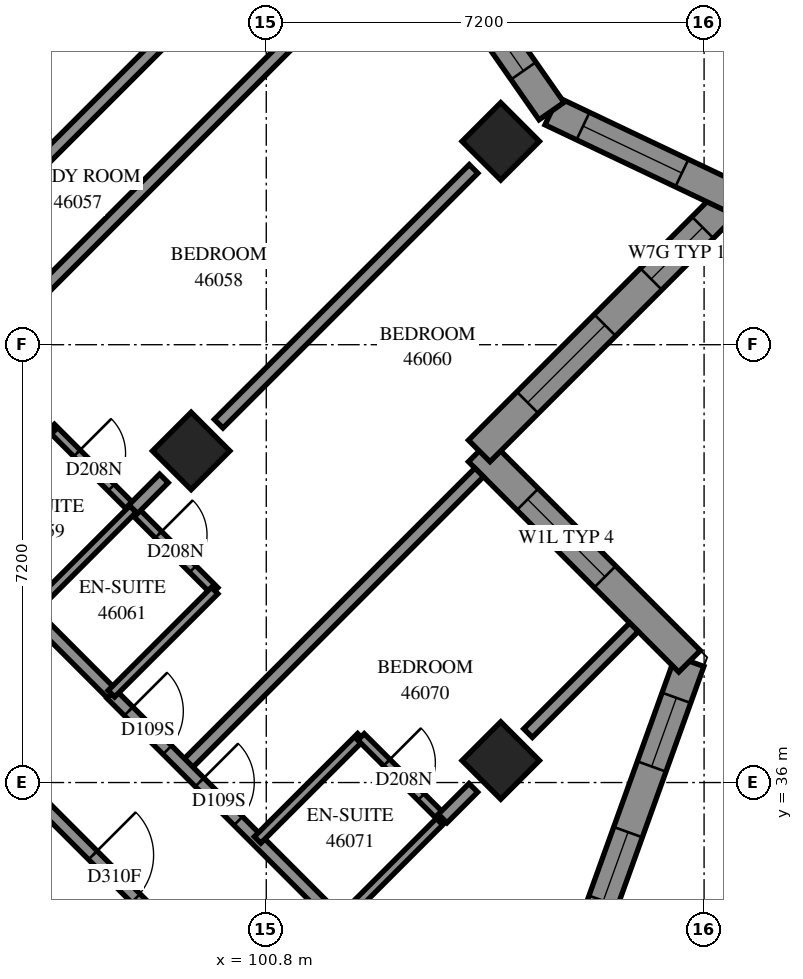
"""IFC4 building model, lengths in metres.
Left out: names, types, materials, properties, quantities, classifications, styles, units other than length and angle.
Written with IfcOpenShell. Run it as: python <this file> out.ifc"""

import sys

from ifc_helpers import new_model, si_unit, direction, frame, frame_2d, origin, origin_2d, place, context, subcontext, project, spatial, polyline, rectangle, outline, extrude, element, fill, save


model = new_model("IFC4")
c1 = context("Model", 3, precision=1e-05, world=origin(), true_north=direction((0.0, 1.0)))
c2 = subcontext(c1, "Body", "Model", "MODEL_VIEW")
j1 = project(units=[si_unit("LENGTHUNIT", "METRE"), si_unit("PLANEANGLEUNIT", "RADIAN")], contexts=[c1])
p1 = place(None, origin())
s1 = spatial("IfcSite", under=j1, at=p1, CompositionType="ELEMENT")
p2 = place(p1, origin())
s2 = spatial("IfcBuilding", under=s1, at=p2, CompositionType="ELEMENT")
p3 = place(p2, frame((0.0, 0.0, 169.4)))
s3 = spatial("IfcBuildingStorey", under=s2, at=p3, CompositionType="ELEMENT", Elevation=169.4)
for number, where, z_axis, x_axis in (
    (1, (104.656, 46.544, 0.0), (0.0, 0.0, 1.0), (0.707, -0.707, 0.0)),
    (2, (99.565, 41.453, 0.0), (0.0, 0.0, 1.0), (0.707, -0.707, 0.0)),
    (3, (104.656, 36.362, 0.0), (0.0, 0.0, 1.0), (0.707, -0.707, 0.0)),
):
    element("IfcColumn", number, at=place(p3, frame(where, z_axis=z_axis, x_axis=x_axis)), inside=s3, PredefinedType="COLUMN", context=c2, shape_type="SweptSolid", body=[
        extrude(rectangle(XDim=0.9, YDim=0.9, at=origin_2d()), origin(), (0.0, 0.0, 1.0), 3.1),
    ])
p4 = place(p3, frame((87.049, 38.695, -0.3), z_axis=(0.0, 0.0, 1.0), x_axis=(0.7071067812, 0.7071067812, 0.0)))
e4 = element("IfcWall", 4, at=p4, inside=s3, PredefinedType="SHEAR", context=c2, shape_type="SweptSolid", body=[
    extrude(rectangle(XDim=14.4, YDim=0.6, at=frame_2d((7.2, 0.0))), origin(), (0.0, 0.0, 1.0), 2.7),
])
p5 = place(p4, frame((4.55, 0.0, 0.3)))
e5 = element("IfcOpeningElement", 5, at=p5, cuts=e4, PredefinedType="OPENING", context=c2, shape_type="SweptSolid", body=[
    extrude(rectangle(XDim=1.1, YDim=2.1, at=frame_2d((0.55, 1.05))), frame((0.0, 0.31, 0.0), z_axis=(0.0, -1.0, 0.0), x_axis=(1.0, 0.0, 0.0)), (0.0, 0.0, 1.0), 0.62),
])
p6 = place(p4, frame((11.35, 0.0, 0.3)))
e6 = element("IfcOpeningElement", 6, at=p6, cuts=e4, PredefinedType="OPENING", context=c2, shape_type="SweptSolid", body=[
    extrude(rectangle(XDim=1.1, YDim=2.1, at=frame_2d((0.55, 1.05))), frame((0.0, 0.31, 0.0), z_axis=(0.0, -1.0, 0.0), x_axis=(1.0, 0.0, 0.0)), (0.0, 0.0, 1.0), 0.62),
])
p7 = place(p3, frame((105.943, 32.946, 0.0), z_axis=(0.0, 0.0, 1.0), x_axis=(0.3387755622, 0.9408672162, 0.0)))
e7 = element("IfcWall", 7, at=p7, inside=s3, PredefinedType="SOLIDWALL", context=c2, shape_type="SweptSolid", body=[
    extrude(outline(polyline([(-0.113, -0.25), (5.524, -0.25), (5.207, 0.25), (0.113, 0.25), (-0.113, -0.25)])), origin(), (0.0, 0.0, 1.0), 3.1),
])
p8 = place(p7, frame((1.179, 0.0, 0.45)))
e8 = element("IfcOpeningElement", 8, at=p8, cuts=e7, PredefinedType="OPENING", context=c2, shape_type="SweptSolid", body=[
    extrude(rectangle(XDim=1.2, YDim=2.5, at=frame_2d((0.6, 1.25))), frame((0.0, 0.26, 0.0), z_axis=(0.0, -1.0, 0.0), x_axis=(1.0, 0.0, 0.0)), (0.0, 0.0, 1.0), 0.52),
])
p9 = place(p7, frame((3.527, 0.0, 0.45)))
e9 = element("IfcOpeningElement", 9, at=p9, cuts=e7, PredefinedType="OPENING", context=c2, shape_type="SweptSolid", body=[
    extrude(rectangle(XDim=1.2, YDim=2.5, at=frame_2d((0.6, 1.25))), frame((0.0, 0.26, 0.0), z_axis=(0.0, -1.0, 0.0), x_axis=(1.0, 0.0, 0.0)), (0.0, 0.0, 1.0), 0.52),
])
p10 = place(p3, frame((107.761, 37.994, 0.0), z_axis=(0.0, 0.0, 1.0), x_axis=(-0.7071170031, 0.7070965591, 0.0)))
e10 = element("IfcWall", 10, at=p10, inside=s3, PredefinedType="SOLIDWALL", context=c2, shape_type="SweptSolid", body=[
    extrude(outline(polyline([(-0.159, -0.25), (4.641, -0.25), (5.141, 0.25), (0.159, 0.25), (-0.159, -0.25)])), origin(), (0.0, 0.0, 1.0), 3.1),
])
p11 = place(p10, frame((1.966, 0.0, 0.6)))
e11 = element("IfcOpeningElement", 11, at=p11, cuts=e10, PredefinedType="OPENING", context=c2, shape_type="SweptSolid", body=[
    extrude(rectangle(XDim=1.8, YDim=1.9, at=frame_2d((0.9, 0.95))), frame((0.0, 0.26, 0.0), z_axis=(0.0, -1.0, 0.0), x_axis=(1.0, 0.0, 0.0)), (0.0, 0.0, 1.0), 0.52),
])
p12 = place(p3, frame((104.302, 41.453, 0.0), z_axis=(0.0, 0.0, 1.0), x_axis=(0.7071237335, 0.7070898285, 0.0)))
e12 = element("IfcWall", 12, at=p12, inside=s3, PredefinedType="SOLIDWALL", context=c2, shape_type="SweptSolid", body=[
    extrude(outline(polyline([(0.25, -0.25), (6.253, -0.25), (5.545, 0.25), (-0.25, 0.25), (0.25, -0.25)])), origin(), (0.0, 0.0, 1.0), 2.6),
])
p13 = place(p12, frame((1.125, 0.0, 0.6)))
e13 = element("IfcOpeningElement", 13, at=p13, cuts=e12, PredefinedType="OPENING", context=c2, shape_type="SweptSolid", body=[
    extrude(rectangle(XDim=1.8, YDim=1.9, at=frame_2d((0.9, 0.95))), frame((0.0, 0.26, 0.0), z_axis=(0.0, -1.0, 0.0), x_axis=(1.0, 0.0, 0.0)), (0.0, 0.0, 1.0), 0.52),
])
p14 = place(p12, frame((3.997, 0.0, 0.6)))
e14 = element("IfcOpeningElement", 14, at=p14, cuts=e12, PredefinedType="OPENING", context=c2, shape_type="SweptSolid", body=[
    extrude(rectangle(XDim=1.2, YDim=1.9, at=frame_2d((0.6, 0.95))), frame((0.0, 0.26, 0.0), z_axis=(0.0, -1.0, 0.0), x_axis=(1.0, 0.0, 0.0)), (0.0, 0.0, 1.0), 0.52),
])
p15 = place(p3, frame((108.473, 45.624, 0.0), z_axis=(0.0, 0.0, 1.0), x_axis=(-0.9031580638, 0.4293081781, 0.0)))
e15 = element("IfcWall", 15, at=p15, inside=s3, PredefinedType="SOLIDWALL", context=c2, shape_type="SweptSolid", body=[
    extrude(outline(polyline([(-0.354, -0.25), (3.236, -0.25), (3.369, 0.25), (0.354, 0.25), (-0.354, -0.25)])), origin(), (0.0, 0.0, 1.0), 2.6),
])
p16 = place(p15, frame((0.928, 0.0, 0.6)))
e16 = element("IfcOpeningElement", 16, at=p16, cuts=e15, PredefinedType="OPENING", context=c2, shape_type="SweptSolid", body=[
    extrude(rectangle(XDim=1.8, YDim=1.9, at=frame_2d((0.9, 0.95))), frame((0.0, 0.26, 0.0), z_axis=(0.0, -1.0, 0.0), x_axis=(1.0, 0.0, 0.0)), (0.0, 0.0, 1.0), 0.52),
])
p17 = place(p3, frame((105.491, 47.042, 0.0), z_axis=(0.0, 0.0, 1.0), x_axis=(-0.5720427166, 0.8202238295, 0.0)))
e17 = element("IfcWall", 17, at=p17, inside=s3, PredefinedType="SOLIDWALL", context=c2, shape_type="SweptSolid", body=[
    extrude(outline(polyline([(0.066, -0.25), (3.502, -0.25), (3.413, 0.25), (-0.066, 0.25), (0.066, -0.25)])), origin(), (0.0, 0.0, 1.0), 3.1),
])
p18 = place(p17, frame((0.807, 0.0, 0.6)))
e18 = element("IfcOpeningElement", 18, at=p18, cuts=e17, PredefinedType="OPENING", context=c2, shape_type="SweptSolid", body=[
    extrude(rectangle(XDim=1.8, YDim=1.9, at=frame_2d((0.9, 0.95))), frame((0.0, 0.26, 0.0), z_axis=(0.0, -1.0, 0.0), x_axis=(1.0, 0.0, 0.0)), (0.0, 0.0, 1.0), 0.52),
])
p19 = place(p3, frame((94.366, 41.348, 0.0), z_axis=(0.0, 0.0, 1.0), x_axis=(0.7071108904, 0.707102672, 0.0)))
e19 = element("IfcWall", 19, at=p19, inside=s3, PredefinedType="PARTITIONING", context=c2, shape_type="SweptSolid", body=[
    extrude(rectangle(XDim=12.168, YDim=0.2, at=frame_2d((6.084, 0.0))), origin(), (0.0, 0.0, 1.0), 3.1),
])
p20 = place(p3, frame((91.967, 40.785, 0.0), z_axis=(0.0, 0.0, 1.0), x_axis=(0.7071067812, -0.7071067812, 0.0)))
e20 = element("IfcWall", 20, at=p20, inside=s3, PredefinedType="PARTITIONING", context=c2, shape_type="SweptSolid", body=[
    extrude(rectangle(XDim=12.1, YDim=0.2, at=frame_2d((6.05, 0.0))), origin(), (0.0, 0.0, 1.0), 3.1),
])
p21 = place(p20, frame((3.448, 0.0, 0.0)))
e21 = element("IfcOpeningElement", 21, at=p21, cuts=e20, PredefinedType="OPENING", context=c2, shape_type="SweptSolid", body=[
    extrude(rectangle(XDim=0.9, YDim=2.1, at=frame_2d((0.45, 1.05))), frame((0.0, 0.11, 0.0), z_axis=(0.0, -1.0, 0.0), x_axis=(1.0, 0.0, 0.0)), (0.0, 0.0, 1.0), 0.22),
])
p22 = place(p20, frame((8.457, 0.0, 0.0)))
e22 = element("IfcOpeningElement", 22, at=p22, cuts=e20, PredefinedType="OPENING", context=c2, shape_type="SweptSolid", body=[
    extrude(rectangle(XDim=1.0, YDim=2.1, at=frame_2d((0.5, 1.05))), frame((0.0, 0.11, 0.0), z_axis=(0.0, -1.0, 0.0), x_axis=(1.0, 0.0, 0.0)), (0.0, 0.0, 1.0), 0.22),
])
p23 = place(p3, frame((93.306, 42.408, 0.0), z_axis=(0.0, 0.0, 1.0), x_axis=(0.7071067812, 0.7071067812, 0.0)))
e23 = element("IfcWall", 23, at=p23, inside=s3, PredefinedType="PARTITIONING", context=c2, shape_type="SweptSolid", body=[
    extrude(rectangle(XDim=9.45, YDim=0.2, at=frame_2d((4.725, 0.0))), origin(), (0.0, 0.0, 1.0), 3.1),
])
p24 = place(p23, frame((0.253, 0.0, 0.0)))
e24 = element("IfcOpeningElement", 24, at=p24, cuts=e23, PredefinedType="OPENING", context=c2, shape_type="SweptSolid", body=[
    extrude(rectangle(XDim=1.0, YDim=2.1, at=frame_2d((0.5, 1.05))), frame((0.0, 0.11, 0.0), z_axis=(0.0, -1.0, 0.0), x_axis=(1.0, 0.0, 0.0)), (0.0, 0.0, 1.0), 0.22),
])
p25 = place(p3, frame((99.458, 36.256, 0.0), z_axis=(0.0, 0.0, 1.0), x_axis=(0.7071067812, 0.7071067812, 0.0)))
e25 = element("IfcWall", 25, at=p25, inside=s3, PredefinedType="PARTITIONING", context=c2, shape_type="SweptSolid", body=[
    extrude(rectangle(XDim=6.85, YDim=0.2, at=frame_2d((3.425, 0.0))), origin(), (0.0, 0.0, 1.0), 3.1),
])
p26 = place(p3, frame((100.017, 41.901, 0.0), z_axis=(0.0, 0.0, 1.0), x_axis=(0.7072754814, 0.7069380408, 0.0)))
e26 = element("IfcWall", 26, at=p26, inside=s3, PredefinedType="PARTITIONING", context=c2, shape_type="SweptSolid", body=[
    extrude(rectangle(XDim=5.927, YDim=0.2, at=frame_2d((2.963, 0.0))), origin(), (0.0, 0.0, 1.0), 3.1),
])
p27 = place(p3, frame((98.253, 37.455, 0.0), z_axis=(0.0, 0.0, 1.0), x_axis=(0.7071067812, -0.7071067812, 0.0)))
e27 = element("IfcWall", 27, at=p27, inside=s3, PredefinedType="PARTITIONING", context=c2, shape_type="SweptSolid", body=[
    extrude(rectangle(XDim=5.301, YDim=0.2, at=frame_2d((2.65, 0.0))), origin(), (0.0, 0.0, 1.0), 3.1),
])
p28 = place(p27, frame((0.401, 0.0, 0.0)))
e28 = element("IfcOpeningElement", 28, at=p28, cuts=e27, PredefinedType="OPENING", context=c2, shape_type="SweptSolid", body=[
    extrude(rectangle(XDim=0.9, YDim=2.1, at=frame_2d((0.45, 1.05))), frame((0.0, 0.11, 0.0), z_axis=(0.0, -1.0, 0.0), x_axis=(1.0, 0.0, 0.0)), (0.0, 0.0, 1.0), 0.22),
])
p29 = place(p27, frame((2.05, 0.0, 0.0)))
e29 = element("IfcOpeningElement", 29, at=p29, cuts=e27, PredefinedType="OPENING", context=c2, shape_type="SweptSolid", body=[
    extrude(rectangle(XDim=0.9, YDim=2.1, at=frame_2d((0.45, 1.05))), frame((0.0, 0.11, 0.0), z_axis=(0.0, -1.0, 0.0), x_axis=(1.0, 0.0, 0.0)), (0.0, 0.0, 1.0), 0.22),
])
p30 = place(p3, frame((97.263, 41.839, 0.0), z_axis=(0.0, 0.0, 1.0), x_axis=(0.7071067812, -0.7071067812, 0.0)))
e30 = element("IfcWall", 30, at=p30, inside=s3, PredefinedType="PARTITIONING", context=c2, shape_type="SweptSolid", body=[
    extrude(rectangle(XDim=3.801, YDim=0.15, at=frame_2d((1.901, 0.0))), origin(), (0.0, 0.0, 1.0), 3.1),
])
p31 = place(p30, frame((0.598, 0.0, 0.0)))
e31 = element("IfcOpeningElement", 31, at=p31, cuts=e30, PredefinedType="OPENING", context=c2, shape_type="SweptSolid", body=[
    extrude(rectangle(XDim=0.8, YDim=2.1, at=frame_2d((0.4, 1.05))), frame((0.0, 0.085, 0.0), z_axis=(0.0, -1.0, 0.0), x_axis=(1.0, 0.0, 0.0)), (0.0, 0.0, 1.0), 0.17),
])
p32 = place(p30, frame((2.493, 0.0, 0.0)))
e32 = element("IfcOpeningElement", 32, at=p32, cuts=e30, PredefinedType="OPENING", context=c2, shape_type="SweptSolid", body=[
    extrude(rectangle(XDim=0.8, YDim=2.1, at=frame_2d((0.4, 1.05))), frame((0.0, 0.085, 0.0), z_axis=(0.0, -1.0, 0.0), x_axis=(1.0, 0.0, 0.0)), (0.0, 0.0, 1.0), 0.17),
])
p33 = place(p3, frame((95.573, 40.148, 0.0), z_axis=(0.0, 0.0, 1.0), x_axis=(0.7068698107, -0.7073436723, 0.0)))
e33 = element("IfcWall", 33, at=p33, inside=s3, PredefinedType="PARTITIONING", context=c2, shape_type="SweptSolid", body=[
    extrude(rectangle(XDim=3.799, YDim=0.2, at=frame_2d((1.899, 0.0))), origin(), (0.0, 0.0, 1.0), 3.1),
])
p34 = place(p3, frame((105.105, 36.813, 0.0), z_axis=(0.0, 0.0, 1.0), x_axis=(0.7071067812, 0.7071067812, 0.0)))
e34 = element("IfcWall", 34, at=p34, inside=s3, PredefinedType="PARTITIONING", context=c2, shape_type="SweptSolid", body=[
    extrude(rectangle(XDim=2.463, YDim=0.2, at=frame_2d((1.232, 0.0))), origin(), (0.0, 0.0, 1.0), 3.1),
])
p35 = place(p3, frame((102.003, 33.711, 0.0), z_axis=(0.0, 0.0, 1.0), x_axis=(0.7071067812, 0.7071067812, 0.0)))
e35 = element("IfcWall", 35, at=p35, inside=s3, PredefinedType="PARTITIONING", context=c2, shape_type="SweptSolid", body=[
    extrude(rectangle(XDim=2.401, YDim=0.15, at=frame_2d((1.201, 0.0))), origin(), (0.0, 0.0, 1.0), 2.6),
])
for number, where, z_axis, x_axis in (
    (36, (95.571, 40.143, 0.0), (0.0, 0.0, 1.0), (0.707, 0.708, 0.0)),
    (37, (98.253, 37.461, 0.0), (0.0, 0.0, 1.0), (0.708, 0.707, 0.0)),
    (38, (100.657, 35.057, 0.0), (0.0, 0.0, 1.0), (0.708, 0.707, 0.0)),
):
    element("IfcWall", number, at=place(p3, frame(where, z_axis=z_axis, x_axis=x_axis)), inside=s3, PredefinedType="PARTITIONING", context=c2, shape_type="SweptSolid", body=[
        extrude(rectangle(XDim=2.4, YDim=0.15, at=frame_2d((1.2, 0.0))), origin(), (0.0, 0.0, 1.0), 3.1),
    ])
p36 = place(p3, frame((96.913, 38.803, 0.0), z_axis=(0.0, 0.0, 1.0), x_axis=(0.7071067812, 0.7071067812, 0.0)))
e39 = element("IfcWall", 39, at=p36, inside=s3, PredefinedType="PARTITIONING", context=c2, shape_type="SweptSolid", body=[
    extrude(rectangle(XDim=2.398, YDim=0.15, at=frame_2d((1.199, 0.0))), origin(), (0.0, 0.0, 1.0), 3.1),
])
p37 = place(p3, frame((102.358, 36.75, 0.0), z_axis=(0.0, 0.0, 1.0), x_axis=(0.7076330979, -0.7065800724, 0.0)))
e40 = element("IfcWall", 40, at=p37, inside=s3, PredefinedType="PARTITIONING", context=c2, shape_type="SweptSolid", body=[
    extrude(rectangle(XDim=1.899, YDim=0.15, at=frame_2d((0.95, 0.0))), origin(), (0.0, 0.0, 1.0), 3.1),
])
p38 = place(p37, frame((0.597, 0.0, 0.0)))
e41 = element("IfcOpeningElement", 41, at=p38, cuts=e40, PredefinedType="OPENING", context=c2, shape_type="SweptSolid", body=[
    extrude(rectangle(XDim=0.8, YDim=2.1, at=frame_2d((0.4, 1.05))), frame((0.0, 0.085, 0.0), z_axis=(0.0, -1.0, 0.0), x_axis=(1.0, 0.0, 0.0)), (0.0, 0.0, 1.0), 0.17),
])
p39 = place(p3, frame((98.613, 40.495, 0.0), z_axis=(0.0, 0.0, 1.0), x_axis=(0.7057051861, 0.7085056035, 0.0)))
e42 = element("IfcWall", 42, at=p39, inside=s3, PredefinedType="PARTITIONING", context=c2, shape_type="SweptSolid", body=[
    extrude(rectangle(XDim=0.714, YDim=0.2, at=frame_2d((0.357, 0.0))), origin(), (0.0, 0.0, 1.0), 3.1),
])
p40 = place(p3, frame((103.701, 35.409, 0.0), z_axis=(0.0, 0.0, 1.0), x_axis=(0.7071067812, 0.7071067812, 0.0)))
e43 = element("IfcWall", 43, at=p40, inside=s3, PredefinedType="PARTITIONING", context=c2, shape_type="SweptSolid", body=[
    extrude(rectangle(XDim=0.713, YDim=0.2, at=frame_2d((0.356, 0.0))), origin(), (0.0, 0.0, 1.0), 2.6),
])
p41 = place(p8, origin())
e44 = element("IfcWindow", 44, at=p41, inside=s3, PartitioningType="SINGLE_PANEL", PredefinedType="WINDOW", context=c2, shape_type="SweptSolid", body=[
    extrude(rectangle(XDim=1.2, YDim=2.5, at=frame_2d((0.6, 1.25))), frame((0.0, 0.18, 0.0), z_axis=(0.0, -1.0, 0.0), x_axis=(1.0, 0.0, 0.0)), (0.0, 0.0, 1.0), 0.06),
])
fill(e8, e44)
p42 = place(p9, origin())
e45 = element("IfcWindow", 45, at=p42, inside=s3, PartitioningType="SINGLE_PANEL", PredefinedType="WINDOW", context=c2, shape_type="SweptSolid", body=[
    extrude(rectangle(XDim=1.2, YDim=2.5, at=frame_2d((0.6, 1.25))), frame((0.0, 0.18, 0.0), z_axis=(0.0, -1.0, 0.0), x_axis=(1.0, 0.0, 0.0)), (0.0, 0.0, 1.0), 0.06),
])
fill(e9, e45)
p43 = place(p11, origin())
e46 = element("IfcWindow", 46, at=p43, inside=s3, PartitioningType="SINGLE_PANEL", PredefinedType="WINDOW", context=c2, shape_type="SweptSolid", body=[
    extrude(rectangle(XDim=1.8, YDim=1.9, at=frame_2d((0.9, 0.95))), frame((0.0, 0.18, 0.0), z_axis=(0.0, -1.0, 0.0), x_axis=(1.0, 0.0, 0.0)), (0.0, 0.0, 1.0), 0.06),
])
fill(e11, e46)
p44 = place(p13, origin())
e47 = element("IfcWindow", 47, at=p44, inside=s3, PartitioningType="SINGLE_PANEL", PredefinedType="WINDOW", context=c2, shape_type="SweptSolid", body=[
    extrude(rectangle(XDim=1.8, YDim=1.9, at=frame_2d((0.9, 0.95))), frame((0.0, 0.18, 0.0), z_axis=(0.0, -1.0, 0.0), x_axis=(1.0, 0.0, 0.0)), (0.0, 0.0, 1.0), 0.06),
])
fill(e13, e47)
p45 = place(p14, origin())
e48 = element("IfcWindow", 48, at=p45, inside=s3, PartitioningType="SINGLE_PANEL", PredefinedType="WINDOW", context=c2, shape_type="SweptSolid", body=[
    extrude(rectangle(XDim=1.2, YDim=1.9, at=frame_2d((0.6, 0.95))), frame((0.0, 0.18, 0.0), z_axis=(0.0, -1.0, 0.0), x_axis=(1.0, 0.0, 0.0)), (0.0, 0.0, 1.0), 0.06),
])
fill(e14, e48)
p46 = place(p16, origin())
e49 = element("IfcWindow", 49, at=p46, inside=s3, PartitioningType="SINGLE_PANEL", PredefinedType="WINDOW", context=c2, shape_type="SweptSolid", body=[
    extrude(rectangle(XDim=1.8, YDim=1.9, at=frame_2d((0.9, 0.95))), frame((0.0, 0.18, 0.0), z_axis=(0.0, -1.0, 0.0), x_axis=(1.0, 0.0, 0.0)), (0.0, 0.0, 1.0), 0.06),
])
fill(e16, e49)
p47 = place(p18, origin())
e50 = element("IfcWindow", 50, at=p47, inside=s3, PartitioningType="SINGLE_PANEL", PredefinedType="WINDOW", context=c2, shape_type="SweptSolid", body=[
    extrude(rectangle(XDim=1.8, YDim=1.9, at=frame_2d((0.9, 0.95))), frame((0.0, 0.18, 0.0), z_axis=(0.0, -1.0, 0.0), x_axis=(1.0, 0.0, 0.0)), (0.0, 0.0, 1.0), 0.06),
])
fill(e18, e50)
p48 = place(p31, origin())
e51 = element("IfcDoor", 51, at=p48, inside=s3, OperationType="SINGLE_SWING_RIGHT", PredefinedType="DOOR", context=c2, shape_type="SweptSolid", body=[
    extrude(rectangle(XDim=0.8, YDim=2.1, at=frame_2d((0.4, 1.05))), frame((0.0, 0.025, 0.0), z_axis=(0.0, -1.0, 0.0), x_axis=(1.0, 0.0, 0.0)), (0.0, 0.0, 1.0), 0.05),
])
fill(e31, e51)
p49 = place(p28, origin())
e52 = element("IfcDoor", 52, at=p49, inside=s3, OperationType="SINGLE_SWING_LEFT", PredefinedType="DOOR", context=c2, shape_type="SweptSolid", body=[
    extrude(rectangle(XDim=0.9, YDim=2.1, at=frame_2d((0.45, 1.05))), frame((0.0, 0.025, 0.0), z_axis=(0.0, -1.0, 0.0), x_axis=(1.0, 0.0, 0.0)), (0.0, 0.0, 1.0), 0.05),
])
fill(e28, e52)
p50 = place(p32, origin())
e53 = element("IfcDoor", 53, at=p50, inside=s3, OperationType="SINGLE_SWING_RIGHT", PredefinedType="DOOR", context=c2, shape_type="SweptSolid", body=[
    extrude(rectangle(XDim=0.8, YDim=2.1, at=frame_2d((0.4, 1.05))), frame((0.0, 0.025, 0.0), z_axis=(0.0, -1.0, 0.0), x_axis=(1.0, 0.0, 0.0)), (0.0, 0.0, 1.0), 0.05),
])
fill(e32, e53)
p51 = place(p22, origin())
e54 = element("IfcDoor", 54, at=p51, inside=s3, OperationType="SINGLE_SWING_RIGHT", PredefinedType="DOOR", context=c2, shape_type="SweptSolid", body=[
    extrude(rectangle(XDim=1.0, YDim=2.1, at=frame_2d((0.5, 1.05))), frame((0.0, 0.025, 0.0), z_axis=(0.0, -1.0, 0.0), x_axis=(1.0, 0.0, 0.0)), (0.0, 0.0, 1.0), 0.05),
])
fill(e22, e54)
p52 = place(p29, origin())
e55 = element("IfcDoor", 55, at=p52, inside=s3, OperationType="SINGLE_SWING_RIGHT", PredefinedType="DOOR", context=c2, shape_type="SweptSolid", body=[
    extrude(rectangle(XDim=0.9, YDim=2.1, at=frame_2d((0.45, 1.05))), frame((0.0, 0.025, 0.0), z_axis=(0.0, -1.0, 0.0), x_axis=(1.0, 0.0, 0.0)), (0.0, 0.0, 1.0), 0.05),
])
fill(e29, e55)
p53 = place(p38, origin())
e56 = element("IfcDoor", 56, at=p53, inside=s3, OperationType="SINGLE_SWING_RIGHT", PredefinedType="DOOR", context=c2, shape_type="SweptSolid", body=[
    extrude(rectangle(XDim=0.8, YDim=2.1, at=frame_2d((0.4, 1.05))), frame((0.0, 0.025, 0.0), z_axis=(0.0, -1.0, 0.0), x_axis=(1.0, 0.0, 0.0)), (0.0, 0.0, 1.0), 0.05),
])
fill(e41, e56)
save(model, sys.argv[1])
